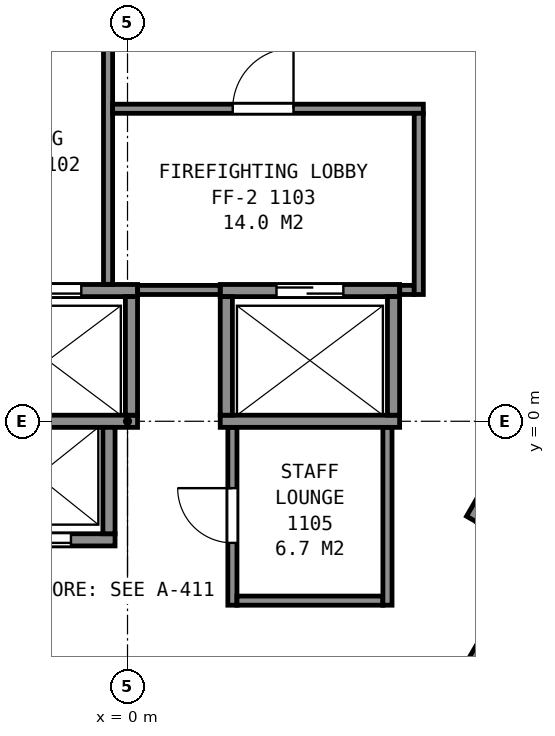
"""IFC4 building model, lengths in metres.
Left out: names, types, materials, properties, quantities, classifications, styles, units other than length and angle.
Written with IfcOpenShell. Run it as: python <this file> out.ifc"""

import sys

from ifc_helpers import new_model, si_unit, direction, frame, frame_2d, origin, place, context, subcontext, project, spatial, rectangle, extrude, element, fill, save


model = new_model("IFC4")
c1 = context("Model", 3, precision=1e-05, world=origin(), true_north=direction((0.0, 1.0)))
c2 = subcontext(c1, "Body", "Model", "MODEL_VIEW")
j1 = project(units=[si_unit("LENGTHUNIT", "METRE"), si_unit("PLANEANGLEUNIT", "RADIAN")], contexts=[c1])
p1 = place(None, origin())
s1 = spatial("IfcSite", under=j1, at=p1, CompositionType="ELEMENT")
p2 = place(p1, origin())
s2 = spatial("IfcBuilding", under=s1, at=p2, CompositionType="ELEMENT")
p3 = place(p2, frame((0.0, 0.0, 54.8)))
s3 = spatial("IfcBuildingStorey", under=s2, at=p3, CompositionType="ELEMENT", Elevation=54.8)
p4 = place(p3, frame((-2.755, -1.95, 0.0), z_axis=(0.0, 0.0, 1.0), x_axis=(1.0, 0.0, 0.0)))
e1 = element("IfcWall", 1, at=p4, inside=s3, PredefinedType="PARTITIONING", context=c2, shape_type="SweptSolid", body=[
    extrude(rectangle(XDim=2.55, YDim=0.2, at=frame_2d((1.275, 0.0))), origin(), (0.0, 0.0, 1.0), 3.6),
])
p5 = place(p4, frame((0.725, 0.0, 0.0)))
e2 = element("IfcOpeningElement", 2, at=p5, cuts=e1, PredefinedType="OPENING", context=c2, shape_type="SweptSolid", body=[
    extrude(rectangle(XDim=1.1, YDim=2.1, at=frame_2d((0.55, 1.05))), frame((0.0, 0.11, 0.0), z_axis=(0.0, -1.0, 0.0), x_axis=(1.0, 0.0, 0.0)), (0.0, 0.0, 1.0), 0.22),
])
p6 = place(p3, frame((-2.785, 0.0, 0.0), z_axis=(0.0, 0.0, 1.0), x_axis=(1.0, 0.0, 0.0)))
e3 = element("IfcWall", 3, at=p6, inside=s3, PredefinedType="PARTITIONING", context=c2, shape_type="SweptSolid", body=[
    extrude(rectangle(XDim=2.95, YDim=0.2, at=frame_2d((1.475, 0.0))), origin(), (0.0, 0.0, 1.0), 3.6),
])
p7 = place(p3, frame((1.525, 0.0, 0.0), z_axis=(0.0, 0.0, 1.0), x_axis=(1.0, 0.0, 0.0)))
e4 = element("IfcWall", 4, at=p7, inside=s3, PredefinedType="PARTITIONING", context=c2, shape_type="SweptSolid", body=[
    extrude(rectangle(XDim=2.95, YDim=0.2, at=frame_2d((1.475, 0.0))), origin(), (0.0, 0.0, 1.0), 3.6),
])
p8 = place(p3, frame((-2.785, 2.15, 0.0), z_axis=(0.0, 0.0, 1.0), x_axis=(1.0, 0.0, 0.0)))
e5 = element("IfcWall", 5, at=p8, inside=s3, PredefinedType="PARTITIONING", context=c2, shape_type="SweptSolid", body=[
    extrude(rectangle(XDim=2.95, YDim=0.2, at=frame_2d((1.475, 0.0))), origin(), (0.0, 0.0, 1.0), 3.6),
])
p9 = place(p8, frame((0.925, 0.0, 0.0)))
e6 = element("IfcOpeningElement", 6, at=p9, cuts=e5, PredefinedType="OPENING", context=c2, shape_type="SweptSolid", body=[
    extrude(rectangle(XDim=1.1, YDim=2.1, at=frame_2d((0.55, 1.05))), frame((0.0, 0.11, 0.0), z_axis=(0.0, -1.0, 0.0), x_axis=(1.0, 0.0, 0.0)), (0.0, 0.0, 1.0), 0.22),
])
p10 = place(p3, frame((1.525, 2.15, 0.0), z_axis=(0.0, 0.0, 1.0), x_axis=(1.0, 0.0, 0.0)))
e7 = element("IfcWall", 7, at=p10, inside=s3, PredefinedType="PARTITIONING", context=c2, shape_type="SweptSolid", body=[
    extrude(rectangle(XDim=2.95, YDim=0.2, at=frame_2d((1.475, 0.0))), origin(), (0.0, 0.0, 1.0), 3.6),
])
p11 = place(p10, frame((0.925, 0.0, 0.0)))
e8 = element("IfcOpeningElement", 8, at=p11, cuts=e7, PredefinedType="OPENING", context=c2, shape_type="SweptSolid", body=[
    extrude(rectangle(XDim=1.1, YDim=2.1, at=frame_2d((0.55, 1.05))), frame((0.0, 0.11, 0.0), z_axis=(0.0, -1.0, 0.0), x_axis=(1.0, 0.0, 0.0)), (0.0, 0.0, 1.0), 0.22),
])
p12 = place(p3, frame((5.527, -4.247, 0.0), z_axis=(0.0, 0.0, 1.0), x_axis=(0.499938297808, 0.866061024631, 0.0)))
e9 = element("IfcWall", 9, at=p12, inside=s3, PredefinedType="PARTITIONING", context=c2, shape_type="SweptSolid", body=[
    extrude(rectangle(XDim=2.35, YDim=0.2, at=frame_2d((1.175, 0.0))), origin(), (0.0, 0.0, 1.0), 3.6),
])
p13 = place(p12, frame((0.725, 0.0, 0.0)))
e10 = element("IfcOpeningElement", 10, at=p13, cuts=e9, PredefinedType="OPENING", context=c2, shape_type="SweptSolid", body=[
    extrude(rectangle(XDim=1.1, YDim=2.1, at=frame_2d((0.55, 1.05))), frame((0.0, 0.11, 0.0), z_axis=(0.0, -1.0, 0.0), x_axis=(1.0, 0.0, 0.0)), (0.0, 0.0, 1.0), 0.22),
])
p14 = place(p3, frame((5.663, -1.612, 0.0), z_axis=(0.0, 0.0, 1.0), x_axis=(0.49998122708, 0.866036242063, 0.0)))
e11 = element("IfcWall", 11, at=p14, inside=s3, PredefinedType="PARTITIONING", context=c2, shape_type="SweptSolid", body=[
    extrude(rectangle(XDim=4.9, YDim=0.2, at=frame_2d((2.45, 0.0))), origin(), (0.0, 0.0, 1.0), 3.6),
])
for number, where, z_axis, x_axis in (
    (12, (4.375, 0.1, 0.0), (0.0, 0.0, 1.0), (0.0, 1.0, 0.0)),
    (13, (1.625, 0.1, 0.0), (0.0, 0.0, 1.0), (0.0, 1.0, 0.0)),
    (14, (0.065, 0.1, 0.0), (0.0, 0.0, 1.0), (0.0, 1.0, 0.0)),
):
    element("IfcWall", number, at=place(p3, frame(where, z_axis=z_axis, x_axis=x_axis)), inside=s3, PredefinedType="PARTITIONING", context=c2, shape_type="SweptSolid", body=[
        extrude(rectangle(XDim=1.95, YDim=0.2, at=frame_2d((0.975, 0.0))), origin(), (0.0, 0.0, 1.0), 3.6),
    ])
p15 = place(p3, frame((-0.305, -1.85, 0.0), z_axis=(0.0, 0.0, 1.0), x_axis=(0.0, 1.0, 0.0)))
e15 = element("IfcWall", 15, at=p15, inside=s3, PredefinedType="PARTITIONING", context=c2, shape_type="SweptSolid", body=[
    extrude(rectangle(XDim=1.75, YDim=0.2, at=frame_2d((0.875, 0.0))), origin(), (0.0, 0.0, 1.0), 3.6),
])
p16 = place(p3, frame((-0.32, 2.252, 0.0), z_axis=(0.0, 0.0, 1.0), x_axis=(0.0, 1.0, 0.0)))
e16 = element("IfcWall", 16, at=p16, inside=s3, PredefinedType="PARTITIONING", context=c2, shape_type="SweptSolid", body=[
    extrude(rectangle(XDim=4.063, YDim=0.15, at=frame_2d((2.031, 0.0))), origin(), (0.0, 0.0, 1.0), 3.35),
])
p17 = place(p3, frame((-0.245, 5.14, 0.0), z_axis=(0.0, 0.0, 1.0), x_axis=(1.0, 0.0, 0.0)))
e17 = element("IfcWall", 17, at=p17, inside=s3, PredefinedType="PARTITIONING", context=c2, shape_type="SweptSolid", body=[
    extrude(rectangle(XDim=5.11, YDim=0.15, at=frame_2d((2.555, 0.0))), origin(), (0.0, 0.0, 1.0), 3.35),
])
p18 = place(p17, frame((1.975, 0.0, 0.0)))
e18 = element("IfcOpeningElement", 18, at=p18, cuts=e17, PredefinedType="OPENING", context=c2, shape_type="SweptSolid", body=[
    extrude(rectangle(XDim=1.0, YDim=2.1, at=frame_2d((0.5, 1.05))), frame((0.0, 0.085, 0.0), z_axis=(0.0, -1.0, 0.0), x_axis=(1.0, 0.0, 0.0)), (0.0, 0.0, 1.0), 0.17),
])
p19 = place(p3, frame((0.167, 2.16, 0.0), z_axis=(0.0, 0.0, 1.0), x_axis=(1.0, 0.0, 0.0)))
e19 = element("IfcWall", 19, at=p19, inside=s3, PredefinedType="PARTITIONING", context=c2, shape_type="SweptSolid", body=[
    extrude(rectangle(XDim=1.356, YDim=0.15, at=frame_2d((0.678, 0.0))), origin(), (0.0, 0.0, 1.0), 3.35),
])
p20 = place(p3, frame((1.725, -0.102, 0.0), z_axis=(0.0, 0.0, 1.0), x_axis=(0.0, -1.0, 0.0)))
e20 = element("IfcWall", 20, at=p20, inside=s3, PredefinedType="PARTITIONING", context=c2, shape_type="SweptSolid", body=[
    extrude(rectangle(XDim=2.923, YDim=0.15, at=frame_2d((1.461, 0.0))), origin(), (0.0, 0.0, 1.0), 3.35),
])
p21 = place(p20, frame((0.998, 0.0, 0.0)))
e21 = element("IfcOpeningElement", 21, at=p21, cuts=e20, PredefinedType="OPENING", context=c2, shape_type="SweptSolid", body=[
    extrude(rectangle(XDim=0.9, YDim=2.1, at=frame_2d((0.45, 1.05))), frame((0.0, 0.085, 0.0), z_axis=(0.0, -1.0, 0.0), x_axis=(1.0, 0.0, 0.0)), (0.0, 0.0, 1.0), 0.17),
])
p22 = place(p3, frame((1.8, -2.95, 0.0), z_axis=(0.0, 0.0, 1.0), x_axis=(1.0, 0.0, 0.0)))
e22 = element("IfcWall", 22, at=p22, inside=s3, PredefinedType="PARTITIONING", context=c2, shape_type="SweptSolid", body=[
    extrude(rectangle(XDim=2.4, YDim=0.15, at=frame_2d((1.2, 0.0))), origin(), (0.0, 0.0, 1.0), 3.35),
])
p23 = place(p3, frame((4.275, -3.025, 0.0), z_axis=(0.0, 0.0, 1.0), x_axis=(0.0, 1.0, 0.0)))
e23 = element("IfcWall", 23, at=p23, inside=s3, PredefinedType="PARTITIONING", context=c2, shape_type="SweptSolid", body=[
    extrude(rectangle(XDim=2.923, YDim=0.15, at=frame_2d((1.461, 0.0))), origin(), (0.0, 0.0, 1.0), 3.35),
])
p24 = place(p3, frame((4.477, 2.16, 0.0), z_axis=(0.0, 0.0, 1.0), x_axis=(1.0, 0.0, 0.0)))
e24 = element("IfcWall", 24, at=p24, inside=s3, PredefinedType="PARTITIONING", context=c2, shape_type="SweptSolid", body=[
    extrude(rectangle(XDim=0.238, YDim=0.15, at=frame_2d((0.119, 0.0))), origin(), (0.0, 0.0, 1.0), 3.35),
])
p25 = place(p3, frame((4.79, 2.085, 0.0), z_axis=(0.0, 0.0, 1.0), x_axis=(0.0, 1.0, 0.0)))
e25 = element("IfcWall", 25, at=p25, inside=s3, PredefinedType="PARTITIONING", context=c2, shape_type="SweptSolid", body=[
    extrude(rectangle(XDim=2.98, YDim=0.15, at=frame_2d((1.49, 0.0))), origin(), (0.0, 0.0, 1.0), 3.35),
])
p26 = place(p3, frame((17.833, 6.406, 0.0), z_axis=(0.0, 0.0, 1.0), x_axis=(-0.500002884005, -0.866023738697, 0.0)))
e26 = element("IfcWall", 26, at=p26, inside=s3, PredefinedType="PARTITIONING", context=c2, shape_type="SweptSolid", body=[
    extrude(rectangle(XDim=28.135, YDim=0.125, at=frame_2d((14.067, 0.0))), origin(), (0.0, 0.0, 1.0), 2.613),
])
p27 = place(p26, frame((26.522, 0.0, 0.0)))
e27 = element("IfcOpeningElement", 27, at=p27, cuts=e26, PredefinedType="OPENING", context=c2, shape_type="SweptSolid", body=[
    extrude(rectangle(XDim=0.9, YDim=2.1, at=frame_2d((0.45, 1.05))), frame((0.0, 0.073, 0.0), z_axis=(0.0, -1.0, 0.0), x_axis=(1.0, 0.0, 0.0)), (0.0, 0.0, 1.0), 0.145),
])
p28 = place(p26, frame((23.184, 0.0, 0.0)))
e28 = element("IfcOpeningElement", 28, at=p28, cuts=e26, PredefinedType="OPENING", context=c2, shape_type="SweptSolid", body=[
    extrude(rectangle(XDim=0.9, YDim=2.1, at=frame_2d((0.45, 1.05))), frame((0.0, 0.073, 0.0), z_axis=(0.0, -1.0, 0.0), x_axis=(1.0, 0.0, 0.0)), (0.0, 0.0, 1.0), 0.145),
])
p29 = place(p26, frame((18.683, 0.0, 0.0)))
e29 = element("IfcOpeningElement", 29, at=p29, cuts=e26, PredefinedType="OPENING", context=c2, shape_type="SweptSolid", body=[
    extrude(rectangle(XDim=0.9, YDim=2.1, at=frame_2d((0.45, 1.05))), frame((0.0, 0.073, 0.0), z_axis=(0.0, -1.0, 0.0), x_axis=(1.0, 0.0, 0.0)), (0.0, 0.0, 1.0), 0.145),
])
p30 = place(p26, frame((14.182, 0.0, 0.0)))
e30 = element("IfcOpeningElement", 30, at=p30, cuts=e26, PredefinedType="OPENING", context=c2, shape_type="SweptSolid", body=[
    extrude(rectangle(XDim=0.9, YDim=2.1, at=frame_2d((0.45, 1.05))), frame((0.0, 0.073, 0.0), z_axis=(0.0, -1.0, 0.0), x_axis=(1.0, 0.0, 0.0)), (0.0, 0.0, 1.0), 0.145),
])
p31 = place(p26, frame((9.681, 0.0, 0.0)))
e31 = element("IfcOpeningElement", 31, at=p31, cuts=e26, PredefinedType="OPENING", context=c2, shape_type="SweptSolid", body=[
    extrude(rectangle(XDim=0.9, YDim=2.1, at=frame_2d((0.45, 1.05))), frame((0.0, 0.073, 0.0), z_axis=(0.0, -1.0, 0.0), x_axis=(1.0, 0.0, 0.0)), (0.0, 0.0, 1.0), 0.145),
])
p32 = place(p26, frame((5.18, 0.0, 0.0)))
e32 = element("IfcOpeningElement", 32, at=p32, cuts=e26, PredefinedType="OPENING", context=c2, shape_type="SweptSolid", body=[
    extrude(rectangle(XDim=0.9, YDim=2.1, at=frame_2d((0.45, 1.05))), frame((0.0, 0.073, 0.0), z_axis=(0.0, -1.0, 0.0), x_axis=(1.0, 0.0, 0.0)), (0.0, 0.0, 1.0), 0.145),
])
p33 = place(p26, frame((1.278, 0.0, 0.0)))
e33 = element("IfcOpeningElement", 33, at=p33, cuts=e26, PredefinedType="OPENING", context=c2, shape_type="SweptSolid", body=[
    extrude(rectangle(XDim=0.9, YDim=2.1, at=frame_2d((0.45, 1.05))), frame((0.0, 0.073, 0.0), z_axis=(0.0, -1.0, 0.0), x_axis=(1.0, 0.0, 0.0)), (0.0, 0.0, 1.0), 0.145),
])
p34 = place(p5, origin())
e34 = element("IfcDoor", 34, at=p34, inside=s3, OperationType="SLIDING_TO_RIGHT", PredefinedType="DOOR", context=c2, shape_type="SweptSolid", body=[
    extrude(rectangle(XDim=1.1, YDim=2.1, at=frame_2d((0.55, 1.05))), frame((0.0, 0.025, 0.0), z_axis=(0.0, -1.0, 0.0), x_axis=(1.0, 0.0, 0.0)), (0.0, 0.0, 1.0), 0.05),
])
fill(e2, e34)
p35 = place(p9, origin())
e35 = element("IfcDoor", 35, at=p35, inside=s3, OperationType="SLIDING_TO_LEFT", PredefinedType="DOOR", context=c2, shape_type="SweptSolid", body=[
    extrude(rectangle(XDim=1.1, YDim=2.1, at=frame_2d((0.55, 1.05))), frame((0.0, 0.025, 0.0), z_axis=(0.0, -1.0, 0.0), x_axis=(1.0, 0.0, 0.0)), (0.0, 0.0, 1.0), 0.05),
])
fill(e6, e35)
p36 = place(p11, origin())
e36 = element("IfcDoor", 36, at=p36, inside=s3, OperationType="SLIDING_TO_RIGHT", PredefinedType="DOOR", context=c2, shape_type="SweptSolid", body=[
    extrude(rectangle(XDim=1.1, YDim=2.1, at=frame_2d((0.55, 1.05))), frame((0.0, 0.025, 0.0), z_axis=(0.0, -1.0, 0.0), x_axis=(1.0, 0.0, 0.0)), (0.0, 0.0, 1.0), 0.05),
])
fill(e8, e36)
p37 = place(p18, origin())
e37 = element("IfcDoor", 37, at=p37, inside=s3, OperationType="SINGLE_SWING_RIGHT", PredefinedType="DOOR", context=c2, shape_type="SweptSolid", body=[
    extrude(rectangle(XDim=1.0, YDim=2.1, at=frame_2d((0.5, 1.05))), frame((0.0, 0.025, 0.0), z_axis=(0.0, -1.0, 0.0), x_axis=(1.0, 0.0, 0.0)), (0.0, 0.0, 1.0), 0.05),
])
fill(e18, e37)
p38 = place(p21, origin())
e38 = element("IfcDoor", 38, at=p38, inside=s3, OperationType="SINGLE_SWING_LEFT", PredefinedType="DOOR", context=c2, shape_type="SweptSolid", body=[
    extrude(rectangle(XDim=0.9, YDim=2.1, at=frame_2d((0.45, 1.05))), frame((0.0, 0.025, 0.0), z_axis=(0.0, -1.0, 0.0), x_axis=(1.0, 0.0, 0.0)), (0.0, 0.0, 1.0), 0.05),
])
fill(e21, e38)
save(model, sys.argv[1])
